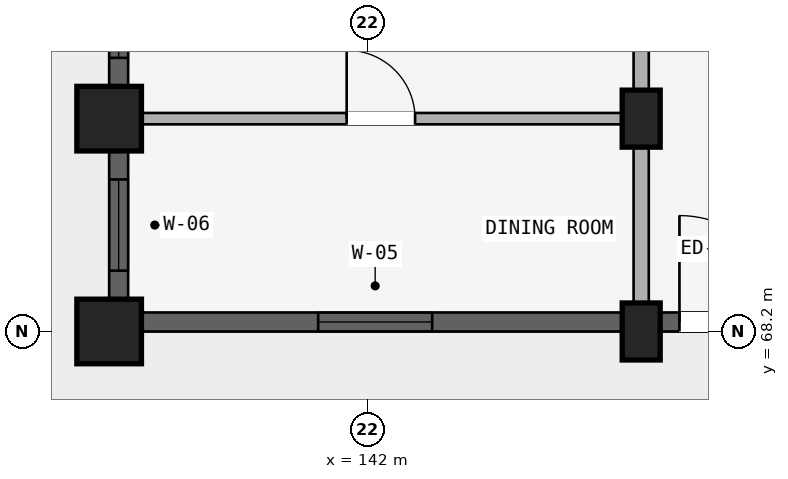
"""IFC4 building model, lengths in metres.
Left out: names, types, materials, properties, quantities, classifications, styles, units other than length and angle.
Written with IfcOpenShell. Run it as: python <this file> out.ifc"""

import sys

from ifc_helpers import new_model, si_unit, direction, frame, frame_2d, origin, origin_2d, place, context, subcontext, project, spatial, rectangle, extrude, element, fill, save


model = new_model("IFC4")
c1 = context("Model", 3, precision=1e-05, world=origin(), true_north=direction((0.0, 1.0)))
c2 = subcontext(c1, "Body", "Model", "MODEL_VIEW")
j1 = project(units=[si_unit("LENGTHUNIT", "METRE"), si_unit("PLANEANGLEUNIT", "RADIAN")], contexts=[c1])
p1 = place(None, origin())
s1 = spatial("IfcSite", under=j1, at=p1, CompositionType="ELEMENT")
p2 = place(p1, origin())
s2 = spatial("IfcBuilding", under=s1, at=p2, CompositionType="ELEMENT")
p3 = place(p2, origin())
s3 = spatial("IfcBuildingStorey", under=s2, at=p3, CompositionType="ELEMENT", Elevation=0.0)
p4 = place(p3, frame((138.6, 71.0, 0.0), z_axis=(0.0, 0.0, 1.0), x_axis=(1.0, 0.0, 0.0)))
e1 = element("IfcColumn", 1, at=p4, inside=s3, PredefinedType="COLUMN", context=c2, shape_type="SweptSolid", body=[
    extrude(rectangle(XDim=0.85, YDim=0.85, at=origin_2d()), origin(), (0.0, 0.0, 1.0), 4.15),
])
p5 = place(p3, frame((145.6, 71.0, 0.0), z_axis=(0.0, 0.0, 1.0), x_axis=(1.0, 0.0, 0.0)))
e2 = element("IfcColumn", 2, at=p5, inside=s3, PredefinedType="COLUMN", context=c2, shape_type="SweptSolid", body=[
    extrude(rectangle(XDim=0.5, YDim=0.75, at=origin_2d()), origin(), (0.0, 0.0, 1.0), 4.15),
])
p6 = place(p3, frame((138.6, 68.2, 0.0), z_axis=(0.0, 0.0, 1.0), x_axis=(1.0, 0.0, 0.0)))
e3 = element("IfcColumn", 3, at=p6, inside=s3, PredefinedType="COLUMN", context=c2, shape_type="SweptSolid", body=[
    extrude(rectangle(XDim=0.85, YDim=0.85, at=origin_2d()), origin(), (0.0, 0.0, 1.0), 4.15),
])
p7 = place(p3, frame((145.6, 68.2, 0.0), z_axis=(0.0, 0.0, 1.0), x_axis=(1.0, 0.0, 0.0)))
e4 = element("IfcColumn", 4, at=p7, inside=s3, PredefinedType="COLUMN", context=c2, shape_type="SweptSolid", body=[
    extrude(rectangle(XDim=0.5, YDim=0.75, at=origin_2d()), origin(), (0.0, 0.0, 1.0), 4.15),
])
p8 = place(p3, frame((145.6, 73.8, 0.0), z_axis=(0.0, 0.0, 1.0), x_axis=(0.0, -1.0, 0.0)))
e5 = element("IfcWall", 5, at=p8, inside=s3, PredefinedType="STANDARD", context=c2, shape_type="SweptSolid", body=[
    extrude(rectangle(XDim=2.8, YDim=0.2, at=frame_2d((1.4, 0.0))), origin(), (0.0, 0.0, 1.0), 3.492),
])
p9 = place(p8, frame((0.9, 0.0, 0.0)))
e6 = element("IfcOpeningElement", 6, at=p9, cuts=e5, PredefinedType="OPENING", context=c2, shape_type="SweptSolid", body=[
    extrude(rectangle(XDim=1.0, YDim=2.15, at=frame_2d((0.5, 1.075))), frame((0.0, 0.11, 0.0), z_axis=(0.0, -1.0, 0.0), x_axis=(1.0, 0.0, 0.0)), (0.0, 0.0, 1.0), 0.22),
])
p10 = place(p3, frame((145.6, 71.0, 0.0), z_axis=(0.0, 0.0, 1.0), x_axis=(0.0, -1.0, 0.0)))
e7 = element("IfcWall", 7, at=p10, inside=s3, PredefinedType="STANDARD", context=c2, shape_type="SweptSolid", body=[
    extrude(rectangle(XDim=2.8, YDim=0.2, at=frame_2d((1.4, 0.0))), origin(), (0.0, 0.0, 1.0), 3.492),
])
p11 = place(p3, frame((138.8, 71.0, 0.0), z_axis=(0.0, 0.0, 1.0), x_axis=(1.0, 0.0, 0.0)))
e8 = element("IfcWall", 8, at=p11, inside=s3, PredefinedType="PARTITIONING", context=c2, shape_type="SweptSolid", body=[
    extrude(rectangle(XDim=6.75, YDim=0.15, at=frame_2d((3.375, 0.0))), origin(), (0.0, 0.0, 1.0), 3.492),
])
p12 = place(p11, frame((2.925, 0.0, 0.0)))
e9 = element("IfcOpeningElement", 9, at=p12, cuts=e8, PredefinedType="OPENING", context=c2, shape_type="SweptSolid", body=[
    extrude(rectangle(XDim=0.9, YDim=2.1, at=frame_2d((0.45, 1.05))), frame((0.0, 0.085, 0.0), z_axis=(0.0, -1.0, 0.0), x_axis=(1.0, 0.0, 0.0)), (0.0, 0.0, 1.0), 0.17),
])
p13 = place(p3, frame((138.725, 73.38, 0.0), z_axis=(0.0, 0.0, 1.0), x_axis=(0.0, -1.0, 0.0)))
e10 = element("IfcWall", 10, at=p13, inside=s3, PredefinedType="STANDARD", context=c2, shape_type="SweptSolid", body=[
    extrude(rectangle(XDim=1.96, YDim=0.25, at=frame_2d((0.98, 0.0))), origin(), (0.0, 0.0, 1.0), 3.692),
])
p14 = place(p13, frame((0.38, 0.0, 0.88)))
e11 = element("IfcOpeningElement", 11, at=p14, cuts=e10, PredefinedType="OPENING", context=c2, shape_type="SweptSolid", body=[
    extrude(rectangle(XDim=1.2, YDim=1.5, at=frame_2d((0.6, 0.75))), frame((0.0, 0.135, 0.0), z_axis=(0.0, -1.0, 0.0), x_axis=(1.0, 0.0, 0.0)), (0.0, 0.0, 1.0), 0.27),
])
p15 = place(p3, frame((138.725, 70.58, 0.0), z_axis=(0.0, 0.0, 1.0), x_axis=(0.0, -1.0, 0.0)))
e12 = element("IfcWall", 12, at=p15, inside=s3, PredefinedType="STANDARD", context=c2, shape_type="SweptSolid", body=[
    extrude(rectangle(XDim=1.96, YDim=0.25, at=frame_2d((0.98, 0.0))), origin(), (0.0, 0.0, 1.0), 3.692),
])
p16 = place(p15, frame((0.38, 0.0, 0.88)))
e13 = element("IfcOpeningElement", 13, at=p16, cuts=e12, PredefinedType="OPENING", context=c2, shape_type="SweptSolid", body=[
    extrude(rectangle(XDim=1.2, YDim=1.5, at=frame_2d((0.6, 0.75))), frame((0.0, 0.135, 0.0), z_axis=(0.0, -1.0, 0.0), x_axis=(1.0, 0.0, 0.0)), (0.0, 0.0, 1.0), 0.27),
])
p17 = place(p3, frame((139.02, 68.325, 0.0), z_axis=(0.0, 0.0, 1.0), x_axis=(1.0, 0.0, 0.0)))
e14 = element("IfcWall", 14, at=p17, inside=s3, PredefinedType="STANDARD", context=c2, shape_type="SweptSolid", body=[
    extrude(rectangle(XDim=6.326, YDim=0.25, at=frame_2d((3.163, 0.0))), origin(), (0.0, 0.0, 1.0), 3.492),
])
p18 = place(p17, frame((2.33, 0.0, 0.88)))
e15 = element("IfcOpeningElement", 15, at=p18, cuts=e14, PredefinedType="OPENING", context=c2, shape_type="SweptSolid", body=[
    extrude(rectangle(XDim=1.5, YDim=1.65, at=frame_2d((0.75, 0.825))), frame((0.0, 0.135, 0.0), z_axis=(0.0, -1.0, 0.0), x_axis=(1.0, 0.0, 0.0)), (0.0, 0.0, 1.0), 0.27),
])
p19 = place(p3, frame((145.854, 68.325, 0.0), z_axis=(0.0, 0.0, 1.0), x_axis=(1.0, 0.0, 0.0)))
e16 = element("IfcWall", 16, at=p19, inside=s3, PredefinedType="STANDARD", context=c2, shape_type="SweptSolid", body=[
    extrude(rectangle(XDim=1.893, YDim=0.25, at=frame_2d((0.947, 0.0))), origin(), (0.0, 0.0, 1.0), 3.492),
])
p20 = place(p19, frame((0.25, 0.0, 0.0)))
e17 = element("IfcOpeningElement", 17, at=p20, cuts=e16, PredefinedType="OPENING", context=c2, shape_type="SweptSolid", body=[
    extrude(rectangle(XDim=1.4, YDim=2.15, at=frame_2d((0.7, 1.075))), frame((0.0, 0.135, 0.0), z_axis=(0.0, -1.0, 0.0), x_axis=(1.0, 0.0, 0.0)), (0.0, 0.0, 1.0), 0.27),
])
p21 = place(p14, origin())
e18 = element("IfcWindow", 18, at=p21, inside=s3, PartitioningType="SINGLE_PANEL", PredefinedType="WINDOW", context=c2, shape_type="SweptSolid", body=[
    extrude(rectangle(XDim=1.2, YDim=1.5, at=frame_2d((0.6, 0.75))), frame((0.0, 0.03, 0.0), z_axis=(0.0, -1.0, 0.0), x_axis=(1.0, 0.0, 0.0)), (0.0, 0.0, 1.0), 0.06),
])
fill(e11, e18)
p22 = place(p16, origin())
e19 = element("IfcWindow", 19, at=p22, inside=s3, PartitioningType="SINGLE_PANEL", PredefinedType="WINDOW", context=c2, shape_type="SweptSolid", body=[
    extrude(rectangle(XDim=1.2, YDim=1.5, at=frame_2d((0.6, 0.75))), frame((0.0, 0.03, 0.0), z_axis=(0.0, -1.0, 0.0), x_axis=(1.0, 0.0, 0.0)), (0.0, 0.0, 1.0), 0.06),
])
fill(e13, e19)
p23 = place(p18, origin())
e20 = element("IfcWindow", 20, at=p23, inside=s3, PartitioningType="DOUBLE_PANEL_VERTICAL", PredefinedType="WINDOW", context=c2, shape_type="SweptSolid", body=[
    extrude(rectangle(XDim=1.5, YDim=1.65, at=frame_2d((0.75, 0.825))), frame((0.0, 0.03, 0.0), z_axis=(0.0, -1.0, 0.0), x_axis=(1.0, 0.0, 0.0)), (0.0, 0.0, 1.0), 0.06),
])
fill(e15, e20)
p24 = place(p12, frame((0.9, 0.0, 0.0), z_axis=(0.0, 0.0, 1.0), x_axis=(-1.0, 0.0, 0.0)))
e21 = element("IfcDoor", 21, at=p24, inside=s3, OperationType="SINGLE_SWING_RIGHT", PredefinedType="DOOR", context=c2, shape_type="SweptSolid", body=[
    extrude(rectangle(XDim=0.9, YDim=2.1, at=frame_2d((0.45, 1.05))), frame((0.0, 0.025, 0.0), z_axis=(0.0, -1.0, 0.0), x_axis=(1.0, 0.0, 0.0)), (0.0, 0.0, 1.0), 0.05),
])
fill(e9, e21)
p25 = place(p20, frame((1.4, 0.0, 0.0), z_axis=(0.0, 0.0, 1.0), x_axis=(-1.0, 0.0, 0.0)))
e22 = element("IfcDoor", 22, at=p25, inside=s3, OperationType="SINGLE_SWING_RIGHT", PredefinedType="DOOR", context=c2, shape_type="SweptSolid", body=[
    extrude(rectangle(XDim=1.4, YDim=2.15, at=frame_2d((0.7, 1.075))), frame((0.0, 0.025, 0.0), z_axis=(0.0, -1.0, 0.0), x_axis=(1.0, 0.0, 0.0)), (0.0, 0.0, 1.0), 0.05),
])
fill(e17, e22)
save(model, sys.argv[1])
